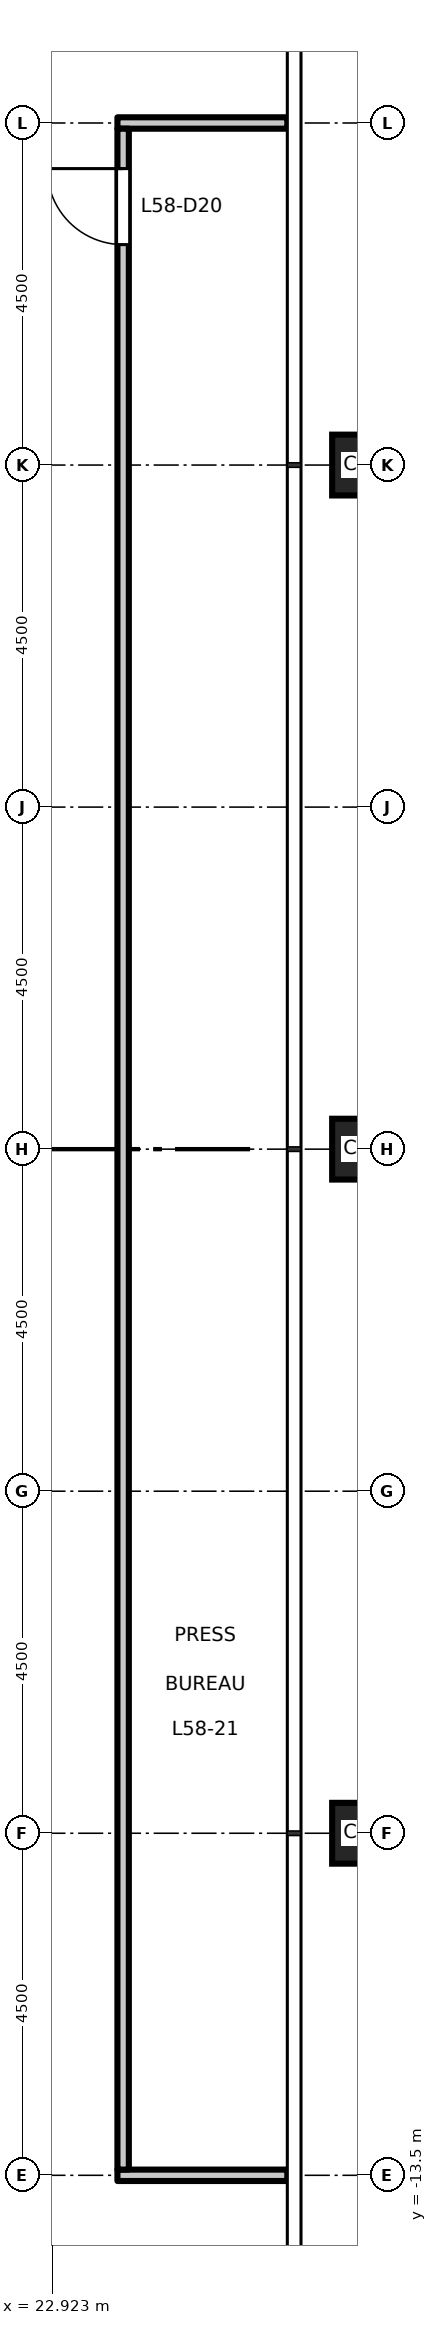
"""IFC4 building model, lengths in metres.
Left out: names, types, materials, properties, quantities, classifications, styles, units other than length and angle.
Written with IfcOpenShell. Run it as: python <this file> out.ifc"""

import sys

from ifc_helpers import new_model, si_unit, direction, frame, frame_2d, origin, origin_2d, place, context, subcontext, project, spatial, rectangle, hollow_rectangle, extrude, element, fill, save


model = new_model("IFC4")
c1 = context("Model", 3, precision=1e-05, world=origin(), true_north=direction((0.0, 1.0)))
c2 = subcontext(c1, "Body", "Model", "MODEL_VIEW")
j1 = project(units=[si_unit("LENGTHUNIT", "METRE"), si_unit("PLANEANGLEUNIT", "RADIAN")], contexts=[c1])
p1 = place(None, origin())
s1 = spatial("IfcSite", under=j1, at=p1, CompositionType="ELEMENT")
p2 = place(p1, origin())
s2 = spatial("IfcBuilding", under=s1, at=p2, CompositionType="ELEMENT")
p3 = place(p2, frame((0.0, 0.0, 269.2)))
s3 = spatial("IfcBuildingStorey", under=s2, at=p3, CompositionType="ELEMENT", Elevation=269.2)
for number, where, z_axis, x_axis in (
    (1, (27.0, -9.0, 0.0), (0.0, 0.0, 1.0), (1.0, 0.0, 0.0)),
    (2, (27.0, 0.0, 0.0), (0.0, 0.0, 1.0), (1.0, 0.0, 0.0)),
    (3, (27.0, 9.0, 0.0), (0.0, 0.0, 1.0), (1.0, 0.0, 0.0)),
):
    element("IfcColumn", number, at=place(p3, frame(where, z_axis=z_axis, x_axis=x_axis)), inside=s3, PredefinedType="COLUMN", context=c2, shape_type="SweptSolid", body=[
        extrude(hollow_rectangle(XDim=0.8, YDim=0.8, WallThickness=0.045, at=origin_2d()), origin(), (0.0, 0.0, 1.0), 4.5),
    ])
p4 = place(p3, frame((23.775, -13.5, 0.0), z_axis=(0.0, 0.0, 1.0), x_axis=(1.0, 0.0, 0.0)))
e4 = element("IfcWall", 4, at=p4, inside=s3, PredefinedType="PARTITIONING", context=c2, shape_type="SweptSolid", body=[
    extrude(rectangle(XDim=2.235, YDim=0.15, at=frame_2d((1.118, 0.0))), origin(), (0.0, 0.0, 1.0), 3.95),
])
p5 = place(p3, frame((23.775, 13.5, 0.0), z_axis=(0.0, 0.0, 1.0), x_axis=(1.0, 0.0, 0.0)))
e5 = element("IfcWall", 5, at=p5, inside=s3, PredefinedType="PARTITIONING", context=c2, shape_type="SweptSolid", body=[
    extrude(rectangle(XDim=2.235, YDim=0.15, at=frame_2d((1.118, 0.0))), origin(), (0.0, 0.0, 1.0), 4.35),
])
p6 = place(p3, frame((23.85, -13.425, 0.0), z_axis=(0.0, 0.0, 1.0), x_axis=(0.0, 1.0, 0.0)))
e6 = element("IfcWall", 6, at=p6, inside=s3, PredefinedType="PARTITIONING", context=c2, shape_type="SweptSolid", body=[
    extrude(rectangle(XDim=26.85, YDim=0.15, at=frame_2d((13.425, 0.0))), origin(), (0.0, 0.0, 1.0), 4.35),
])
p7 = place(p6, frame((25.325, 0.0, 0.0)))
e7 = element("IfcOpeningElement", 7, at=p7, cuts=e6, PredefinedType="OPENING", context=c2, shape_type="SweptSolid", body=[
    extrude(rectangle(XDim=1.0, YDim=2.1, at=frame_2d((0.5, 1.05))), frame((0.0, 0.085, 0.0), z_axis=(0.0, -1.0, 0.0), x_axis=(1.0, 0.0, 0.0)), (0.0, 0.0, 1.0), 0.17),
])
p8 = place(p7, origin())
e8 = element("IfcDoor", 8, at=p8, inside=s3, OperationType="SINGLE_SWING_RIGHT", PredefinedType="DOOR", context=c2, shape_type="SweptSolid", body=[
    extrude(rectangle(XDim=1.0, YDim=2.1, at=frame_2d((0.5, 1.05))), frame((0.0, 0.025, 0.0), z_axis=(0.0, -1.0, 0.0), x_axis=(1.0, 0.0, 0.0)), (0.0, 0.0, 1.0), 0.05),
])
fill(e7, e8)
save(model, sys.argv[1])
